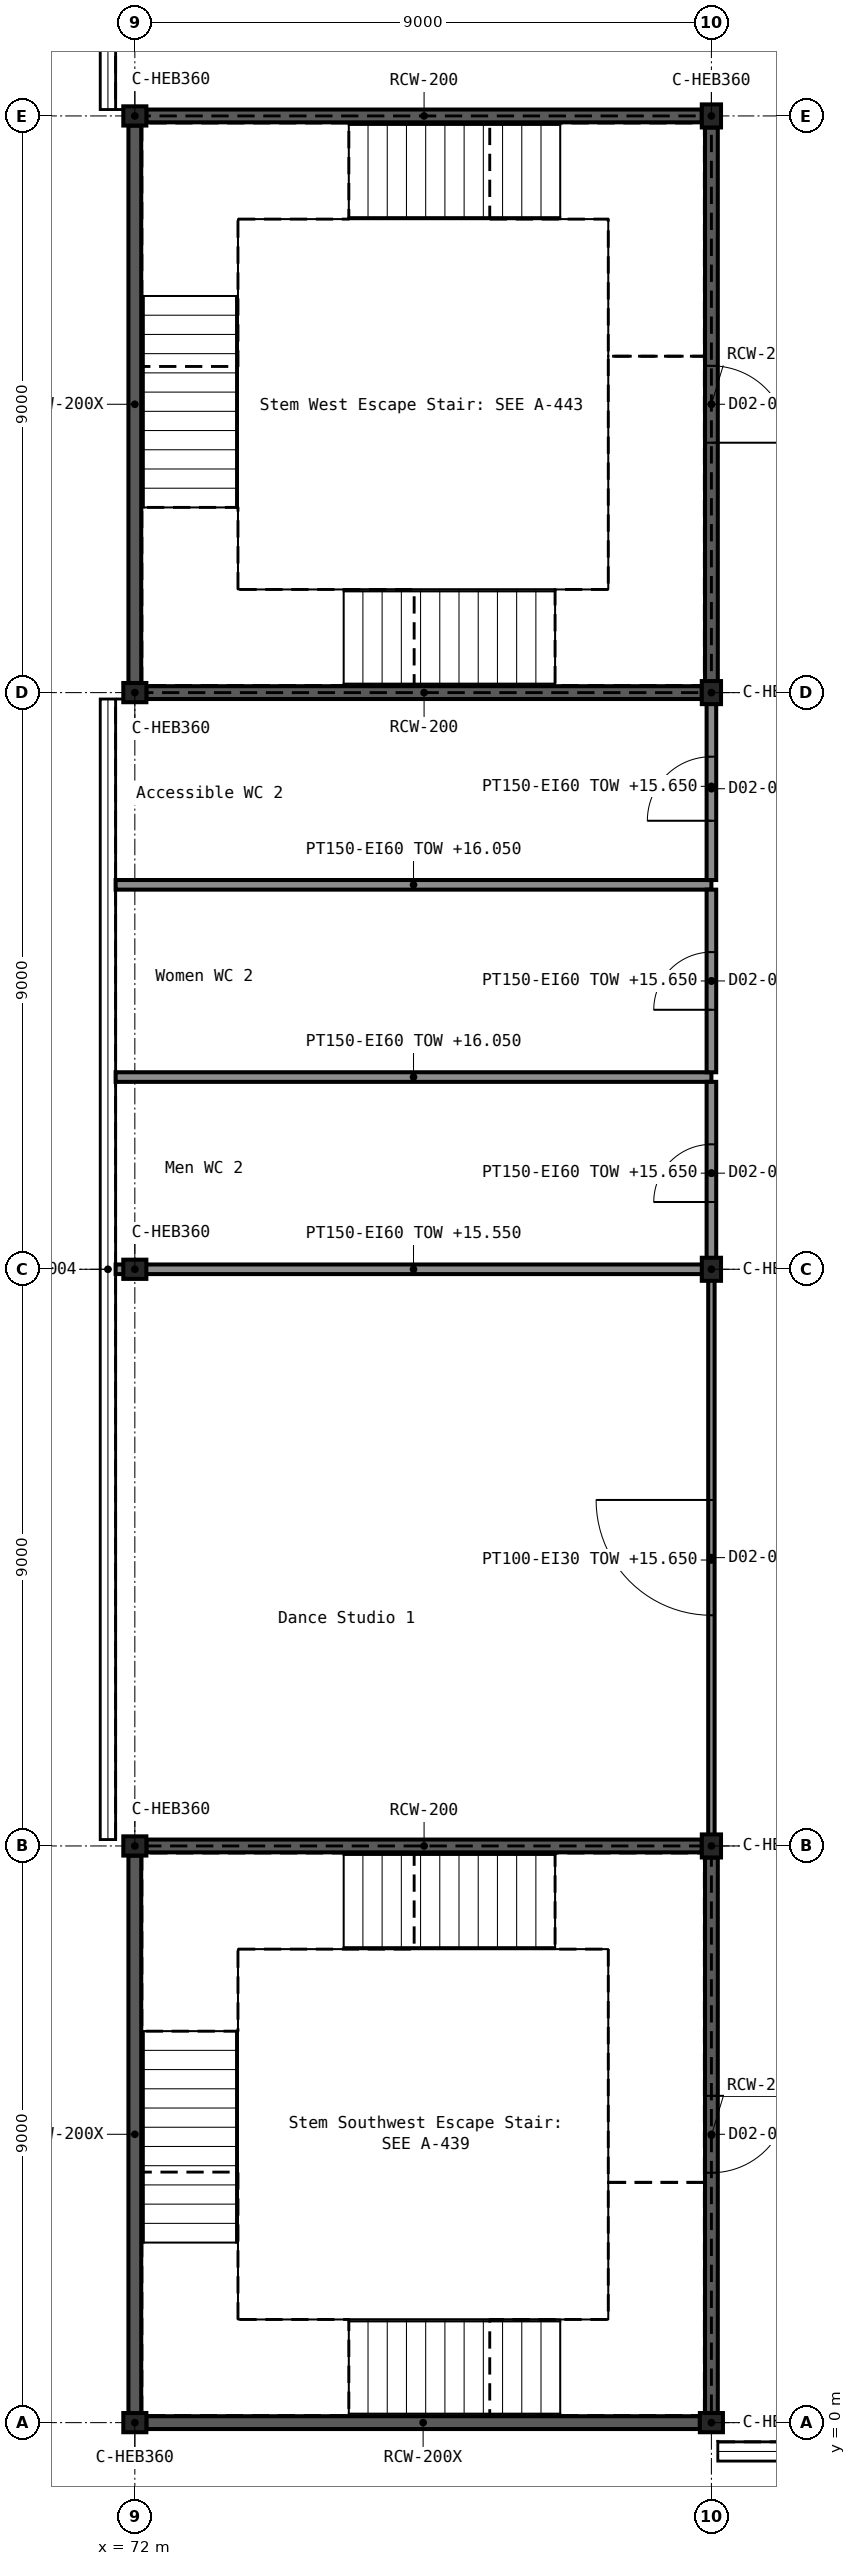
"""IFC4 building model, lengths in metres.
Left out: names, types, materials, properties, quantities, classifications, styles, units other than length and angle.
Written with IfcOpenShell. Run it as: python <this file> out.ifc"""

import sys

from ifc_helpers import new_model, si_unit, direction, frame, frame_2d, origin, origin_2d, place, context, subcontext, project, spatial, rectangle, i_section, extrude, element, fill, save


model = new_model("IFC4")
c1 = context("Model", 3, precision=1e-05, world=origin(), true_north=direction((0.0, 1.0)))
c2 = subcontext(c1, "Body", "Model", "MODEL_VIEW")
j1 = project(units=[si_unit("LENGTHUNIT", "METRE"), si_unit("PLANEANGLEUNIT", "RADIAN")], contexts=[c1])
p1 = place(None, origin())
s1 = spatial("IfcSite", under=j1, at=p1, CompositionType="ELEMENT")
p2 = place(p1, origin())
s2 = spatial("IfcBuilding", under=s1, at=p2, CompositionType="ELEMENT")
p3 = place(p2, frame((0.0, 0.0, 10.8)))
s3 = spatial("IfcBuildingStorey", under=s2, at=p3, CompositionType="ELEMENT", Elevation=10.8)
for number, where, z_axis, x_axis in (
    (1, (72.0, 0.0, 0.0), (0.0, 0.0, 1.0), (0.0, 1.0, 0.0)),
    (2, (81.0, 0.0, 0.0), (0.0, 0.0, 1.0), (0.0, 1.0, 0.0)),
    (3, (72.0, 9.0, 0.0), (0.0, 0.0, 1.0), (0.0, 1.0, 0.0)),
    (4, (81.0, 9.0, 0.0), (0.0, 0.0, 1.0), (1.0, 0.0, 0.0)),
    (5, (72.0, 18.0, 0.0), (0.0, 0.0, 1.0), (0.0, 1.0, 0.0)),
    (6, (81.0, 18.0, 0.0), (0.0, 0.0, 1.0), (1.0, 0.0, 0.0)),
    (7, (72.0, 27.0, 0.0), (0.0, 0.0, 1.0), (0.0, 1.0, 0.0)),
    (8, (81.0, 27.0, 0.0), (0.0, 0.0, 1.0), (1.0, 0.0, 0.0)),
    (9, (72.0, 36.0, 0.0), (0.0, 0.0, 1.0), (0.0, 1.0, 0.0)),
    (10, (81.0, 36.0, 0.0), (0.0, 0.0, 1.0), (1.0, 0.0, 0.0)),
):
    element("IfcColumn", number, at=place(p3, frame(where, z_axis=z_axis, x_axis=x_axis)), inside=s3, PredefinedType="COLUMN", context=c2, shape_type="SweptSolid", body=[
        extrude(i_section(OverallWidth=0.3, OverallDepth=0.36, WebThickness=0.012, FlangeThickness=0.022, FilletRadius=0.027, at=origin_2d()), origin(), (0.0, 0.0, 1.0), 5.4),
    ])
p4 = place(p3, frame((72.18, 0.0, 0.0), z_axis=(0.0, 0.0, 1.0), x_axis=(1.0, 0.0, 0.0)))
e11 = element("IfcWall", 11, at=p4, inside=s3, PredefinedType="SHEAR", context=c2, shape_type="SweptSolid", body=[
    extrude(rectangle(XDim=8.64, YDim=0.2, at=frame_2d((4.32, 0.0))), origin(), (0.0, 0.0, 1.0), 5.4),
])
p5 = place(p3, frame((72.18, 9.0, 0.0), z_axis=(0.0, 0.0, 1.0), x_axis=(1.0, 0.0, 0.0)))
e12 = element("IfcWall", 12, at=p5, inside=s3, PredefinedType="SHEAR", context=c2, shape_type="SweptSolid", body=[
    extrude(rectangle(XDim=8.67, YDim=0.2, at=frame_2d((4.335, 0.0))), origin(), (0.0, 0.0, 1.0), 5.4),
])
p6 = place(p3, frame((72.0, 0.15, 0.0), z_axis=(0.0, 0.0, 1.0), x_axis=(0.0, 1.0, 0.0)))
e13 = element("IfcWall", 13, at=p6, inside=s3, PredefinedType="SHEAR", context=c2, shape_type="SweptSolid", body=[
    extrude(rectangle(XDim=8.7, YDim=0.2, at=frame_2d((4.35, 0.0))), origin(), (0.0, 0.0, 1.0), 5.4),
])
p7 = place(p3, frame((81.0, 0.15, 0.0), z_axis=(0.0, 0.0, 1.0), x_axis=(0.0, 1.0, 0.0)))
e14 = element("IfcWall", 14, at=p7, inside=s3, PredefinedType="SHEAR", context=c2, shape_type="SweptSolid", body=[
    extrude(rectangle(XDim=8.67, YDim=0.2, at=frame_2d((4.335, 0.0))), origin(), (0.0, 0.0, 1.0), 5.4),
])
p8 = place(p7, frame((3.75, 0.0, 0.0)))
e15 = element("IfcOpeningElement", 15, at=p8, cuts=e14, PredefinedType="OPENING", context=c2, shape_type="SweptSolid", body=[
    extrude(rectangle(XDim=1.2, YDim=2.1, at=frame_2d((0.6, 1.05))), frame((0.0, 0.111, 0.0), z_axis=(0.0, -1.0, 0.0), x_axis=(1.0, 0.0, 0.0)), (0.0, 0.0, 1.0), 0.222),
])
for number, where, z_axis, x_axis in (
    (16, (72.18, 27.0, 0.0), (0.0, 0.0, 1.0), (1.0, 0.0, 0.0)),
    (17, (72.18, 36.0, 0.0), (0.0, 0.0, 1.0), (1.0, 0.0, 0.0)),
):
    element("IfcWall", number, at=place(p3, frame(where, z_axis=z_axis, x_axis=x_axis)), inside=s3, PredefinedType="SHEAR", context=c2, shape_type="SweptSolid", body=[
        extrude(rectangle(XDim=8.67, YDim=0.2, at=frame_2d((4.335, 0.0))), origin(), (0.0, 0.0, 1.0), 5.4),
    ])
p9 = place(p3, frame((72.0, 27.15, 0.0), z_axis=(0.0, 0.0, 1.0), x_axis=(0.0, 1.0, 0.0)))
e18 = element("IfcWall", 18, at=p9, inside=s3, PredefinedType="SHEAR", context=c2, shape_type="SweptSolid", body=[
    extrude(rectangle(XDim=8.7, YDim=0.2, at=frame_2d((4.35, 0.0))), origin(), (0.0, 0.0, 1.0), 5.4),
])
p10 = place(p3, frame((81.0, 27.18, 0.0), z_axis=(0.0, 0.0, 1.0), x_axis=(0.0, 1.0, 0.0)))
e19 = element("IfcWall", 19, at=p10, inside=s3, PredefinedType="SHEAR", context=c2, shape_type="SweptSolid", body=[
    extrude(rectangle(XDim=8.64, YDim=0.2, at=frame_2d((4.32, 0.0))), origin(), (0.0, 0.0, 1.0), 5.4),
])
p11 = place(p10, frame((3.72, 0.0, 0.0)))
e20 = element("IfcOpeningElement", 20, at=p11, cuts=e19, PredefinedType="OPENING", context=c2, shape_type="SweptSolid", body=[
    extrude(rectangle(XDim=1.2, YDim=2.1, at=frame_2d((0.6, 1.05))), frame((0.0, 0.111, 0.0), z_axis=(0.0, -1.0, 0.0), x_axis=(1.0, 0.0, 0.0)), (0.0, 0.0, 1.0), 0.222),
])
p12 = place(p3, frame((71.7, 18.0, 0.0), z_axis=(0.0, 0.0, 1.0), x_axis=(1.0, 0.0, 0.0)))
e21 = element("IfcWall", 21, at=p12, inside=s3, PredefinedType="PARTITIONING", context=c2, shape_type="SweptSolid", body=[
    extrude(rectangle(XDim=9.3, YDim=0.15, at=frame_2d((4.65, 0.0))), origin(), (0.0, 0.0, 1.0), 4.75),
])
for number, where, z_axis, x_axis in (
    (22, (71.7, 21.0, 0.0), (0.0, 0.0, 1.0), (1.0, 0.0, 0.0)),
    (23, (71.7, 24.0, 0.0), (0.0, 0.0, 1.0), (1.0, 0.0, 0.0)),
):
    element("IfcWall", number, at=place(p3, frame(where, z_axis=z_axis, x_axis=x_axis)), inside=s3, PredefinedType="PARTITIONING", context=c2, shape_type="SweptSolid", body=[
        extrude(rectangle(XDim=9.3, YDim=0.15, at=frame_2d((4.65, 0.0))), origin(), (0.0, 0.0, 1.0), 5.25),
    ])
p13 = place(p3, frame((81.0, 18.075, 0.0), z_axis=(0.0, 0.0, 1.0), x_axis=(0.0, 1.0, 0.0)))
e24 = element("IfcWall", 24, at=p13, inside=s3, PredefinedType="PARTITIONING", context=c2, shape_type="SweptSolid", body=[
    extrude(rectangle(XDim=2.85, YDim=0.15, at=frame_2d((1.425, 0.0))), origin(), (0.0, 0.0, 1.0), 4.85),
])
p14 = place(p13, frame((0.975, 0.0, 0.0)))
e25 = element("IfcOpeningElement", 25, at=p14, cuts=e24, PredefinedType="OPENING", context=c2, shape_type="SweptSolid", body=[
    extrude(rectangle(XDim=0.9, YDim=2.1, at=frame_2d((0.45, 1.05))), frame((0.0, 0.086, 0.0), z_axis=(0.0, -1.0, 0.0), x_axis=(1.0, 0.0, 0.0)), (0.0, 0.0, 1.0), 0.172),
])
p15 = place(p3, frame((81.0, 21.075, 0.0), z_axis=(0.0, 0.0, 1.0), x_axis=(0.0, 1.0, 0.0)))
e26 = element("IfcWall", 26, at=p15, inside=s3, PredefinedType="PARTITIONING", context=c2, shape_type="SweptSolid", body=[
    extrude(rectangle(XDim=2.85, YDim=0.15, at=frame_2d((1.425, 0.0))), origin(), (0.0, 0.0, 1.0), 4.85),
])
p16 = place(p15, frame((0.975, 0.0, 0.0)))
e27 = element("IfcOpeningElement", 27, at=p16, cuts=e26, PredefinedType="OPENING", context=c2, shape_type="SweptSolid", body=[
    extrude(rectangle(XDim=0.9, YDim=2.1, at=frame_2d((0.45, 1.05))), frame((0.0, 0.086, 0.0), z_axis=(0.0, -1.0, 0.0), x_axis=(1.0, 0.0, 0.0)), (0.0, 0.0, 1.0), 0.172),
])
p17 = place(p3, frame((81.0, 24.075, 0.0), z_axis=(0.0, 0.0, 1.0), x_axis=(0.0, 1.0, 0.0)))
e28 = element("IfcWall", 28, at=p17, inside=s3, PredefinedType="PARTITIONING", context=c2, shape_type="SweptSolid", body=[
    extrude(rectangle(XDim=2.925, YDim=0.15, at=frame_2d((1.462, 0.0))), origin(), (0.0, 0.0, 1.0), 4.85),
])
p18 = place(p17, frame((0.925, 0.0, 0.0)))
e29 = element("IfcOpeningElement", 29, at=p18, cuts=e28, PredefinedType="OPENING", context=c2, shape_type="SweptSolid", body=[
    extrude(rectangle(XDim=1.0, YDim=2.1, at=frame_2d((0.5, 1.05))), frame((0.0, 0.086, 0.0), z_axis=(0.0, -1.0, 0.0), x_axis=(1.0, 0.0, 0.0)), (0.0, 0.0, 1.0), 0.172),
])
p19 = place(p3, frame((81.0, 9.0, 0.0), z_axis=(0.0, 0.0, 1.0), x_axis=(0.0, 1.0, 0.0)))
e30 = element("IfcWall", 30, at=p19, inside=s3, PredefinedType="PARTITIONING", context=c2, shape_type="SweptSolid", body=[
    extrude(rectangle(XDim=8.925, YDim=0.1, at=frame_2d((4.462, 0.0))), origin(), (0.0, 0.0, 1.0), 4.85),
])
p20 = place(p19, frame((3.6, 0.0, 0.0)))
e31 = element("IfcOpeningElement", 31, at=p20, cuts=e30, PredefinedType="OPENING", context=c2, shape_type="SweptSolid", body=[
    extrude(rectangle(XDim=1.8, YDim=2.1, at=frame_2d((0.9, 1.05))), frame((0.0, 0.061, 0.0), z_axis=(0.0, -1.0, 0.0), x_axis=(1.0, 0.0, 0.0)), (0.0, 0.0, 1.0), 0.122),
])
p21 = place(p8, frame((1.2, 0.0, 0.0), z_axis=(0.0, 0.0, 1.0), x_axis=(-1.0, 0.0, 0.0)))
e32 = element("IfcDoor", 32, at=p21, inside=s3, OperationType="SINGLE_SWING_LEFT", PredefinedType="DOOR", context=c2, shape_type="SweptSolid", body=[
    extrude(rectangle(XDim=1.2, YDim=2.1, at=frame_2d((0.6, 1.05))), frame((0.0, 0.025, 0.0), z_axis=(0.0, -1.0, 0.0), x_axis=(1.0, 0.0, 0.0)), (0.0, 0.0, 1.0), 0.05),
])
fill(e15, e32)
p22 = place(p11, frame((1.2, 0.0, 0.0), z_axis=(0.0, 0.0, 1.0), x_axis=(-1.0, 0.0, 0.0)))
e33 = element("IfcDoor", 33, at=p22, inside=s3, OperationType="SINGLE_SWING_RIGHT", PredefinedType="DOOR", context=c2, shape_type="SweptSolid", body=[
    extrude(rectangle(XDim=1.2, YDim=2.1, at=frame_2d((0.6, 1.05))), frame((0.0, 0.025, 0.0), z_axis=(0.0, -1.0, 0.0), x_axis=(1.0, 0.0, 0.0)), (0.0, 0.0, 1.0), 0.05),
])
fill(e20, e33)
p23 = place(p20, origin())
e34 = element("IfcDoor", 34, at=p23, inside=s3, OperationType="DOUBLE_DOOR_SINGLE_SWING", PredefinedType="DOOR", context=c2, shape_type="SweptSolid", body=[
    extrude(rectangle(XDim=1.8, YDim=2.1, at=frame_2d((0.9, 1.05))), frame((0.0, 0.025, 0.0), z_axis=(0.0, -1.0, 0.0), x_axis=(1.0, 0.0, 0.0)), (0.0, 0.0, 1.0), 0.05),
])
fill(e31, e34)
p24 = place(p14, origin())
e35 = element("IfcDoor", 35, at=p24, inside=s3, OperationType="SINGLE_SWING_LEFT", PredefinedType="DOOR", context=c2, shape_type="SweptSolid", body=[
    extrude(rectangle(XDim=0.9, YDim=2.1, at=frame_2d((0.45, 1.05))), frame((0.0, 0.025, 0.0), z_axis=(0.0, -1.0, 0.0), x_axis=(1.0, 0.0, 0.0)), (0.0, 0.0, 1.0), 0.05),
])
fill(e25, e35)
p25 = place(p16, origin())
e36 = element("IfcDoor", 36, at=p25, inside=s3, OperationType="SINGLE_SWING_LEFT", PredefinedType="DOOR", context=c2, shape_type="SweptSolid", body=[
    extrude(rectangle(XDim=0.9, YDim=2.1, at=frame_2d((0.45, 1.05))), frame((0.0, 0.025, 0.0), z_axis=(0.0, -1.0, 0.0), x_axis=(1.0, 0.0, 0.0)), (0.0, 0.0, 1.0), 0.05),
])
fill(e27, e36)
p26 = place(p18, origin())
e37 = element("IfcDoor", 37, at=p26, inside=s3, OperationType="SINGLE_SWING_LEFT", PredefinedType="DOOR", context=c2, shape_type="SweptSolid", body=[
    extrude(rectangle(XDim=1.0, YDim=2.1, at=frame_2d((0.5, 1.05))), frame((0.0, 0.025, 0.0), z_axis=(0.0, -1.0, 0.0), x_axis=(1.0, 0.0, 0.0)), (0.0, 0.0, 1.0), 0.05),
])
fill(e29, e37)
save(model, sys.argv[1])
